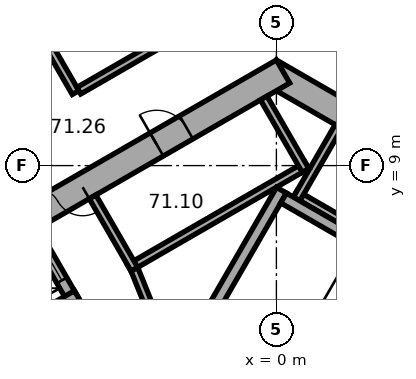
"""IFC4 building model, lengths in metres.
Left out: names, types, materials, properties, quantities, classifications, styles, units other than length and angle.
Written with IfcOpenShell. Run it as: python <this file> out.ifc"""

import sys

from ifc_helpers import new_model, si_unit, direction, frame, frame_2d, origin, place, context, subcontext, project, spatial, rectangle, extrude, element, fill, save


model = new_model("IFC4")
c1 = context("Model", 3, precision=1e-05, world=origin(), true_north=direction((0.0, 1.0)))
c2 = subcontext(c1, "Body", "Model", "MODEL_VIEW")
j1 = project(units=[si_unit("LENGTHUNIT", "METRE"), si_unit("PLANEANGLEUNIT", "RADIAN")], contexts=[c1])
p1 = place(None, origin())
s1 = spatial("IfcSite", under=j1, at=p1, CompositionType="ELEMENT")
p2 = place(p1, origin())
s2 = spatial("IfcBuilding", under=s1, at=p2, CompositionType="ELEMENT")
p3 = place(p2, frame((0.0, 0.0, 289.4)))
s3 = spatial("IfcBuildingStorey", under=s2, at=p3, CompositionType="ELEMENT", Elevation=289.4)
p4 = place(p3, frame((10.025, 5.586, 0.0), z_axis=(0.0, 0.0, 1.0), x_axis=(-0.866026453023, 0.499998182661, 0.0)))
e1 = element("IfcWall", 1, at=p4, inside=s3, PredefinedType="SHEAR", context=c2, shape_type="SweptSolid", body=[
    extrude(rectangle(XDim=11.778, YDim=0.7, at=frame_2d((5.889, 0.0))), origin(), (0.0, 0.0, 1.0), 3.7),
])
p5 = place(p4, frame((5.139, 0.0, 0.0)))
e2 = element("IfcOpeningElement", 2, at=p5, cuts=e1, PredefinedType="OPENING", context=c2, shape_type="SweptSolid", body=[
    extrude(rectangle(XDim=0.9, YDim=2.1, at=frame_2d((0.45, 1.05))), frame((0.0, 0.36, 0.0), z_axis=(0.0, -1.0, 0.0), x_axis=(1.0, 0.0, 0.0)), (0.0, 0.0, 1.0), 0.72),
])
p6 = place(p3, frame((0.175, 11.475, 0.0), z_axis=(0.0, 0.0, 1.0), x_axis=(-0.866026453023, -0.499998182661, 0.0)))
e3 = element("IfcWall", 3, at=p6, inside=s3, PredefinedType="SHEAR", context=c2, shape_type="SweptSolid", body=[
    extrude(rectangle(XDim=11.778, YDim=0.7, at=frame_2d((5.889, 0.0))), origin(), (0.0, 0.0, 1.0), 3.7),
])
p7 = place(p6, frame((6.089, 0.0, 0.0)))
e4 = element("IfcOpeningElement", 4, at=p7, cuts=e3, PredefinedType="OPENING", context=c2, shape_type="SweptSolid", body=[
    extrude(rectangle(XDim=1.5, YDim=2.1, at=frame_2d((0.75, 1.05))), frame((0.0, 0.36, 0.0), z_axis=(0.0, -1.0, 0.0), x_axis=(1.0, 0.0, 0.0)), (0.0, 0.0, 1.0), 0.72),
])
p8 = place(p6, frame((2.939, 0.0, 0.0)))
e5 = element("IfcOpeningElement", 5, at=p8, cuts=e3, PredefinedType="OPENING", context=c2, shape_type="SweptSolid", body=[
    extrude(rectangle(XDim=0.9, YDim=2.1, at=frame_2d((0.45, 1.05))), frame((0.0, 0.36, 0.0), z_axis=(0.0, -1.0, 0.0), x_axis=(1.0, 0.0, 0.0)), (0.0, 0.0, 1.0), 0.72),
])
p9 = place(p3, frame((-2.624, 20.713, 0.0), z_axis=(0.0, 0.0, 1.0), x_axis=(-0.866026460444, -0.499998169808, 0.0)))
e6 = element("IfcWall", 6, at=p9, inside=s3, PredefinedType="STANDARD", context=c2, shape_type="SweptSolid", body=[
    extrude(rectangle(XDim=17.731, YDim=0.2, at=frame_2d((8.866, 0.0))), origin(), (0.0, 0.0, 1.0), 3.7),
])
p10 = place(p9, frame((1.203, 0.0, 0.9)))
e7 = element("IfcOpeningElement", 7, at=p10, cuts=e6, PredefinedType="OPENING", context=c2, shape_type="SweptSolid", body=[
    extrude(rectangle(XDim=2.0, YDim=2.0, at=frame_2d((1.0, 1.0))), frame((0.0, 0.11, 0.0), z_axis=(0.0, -1.0, 0.0), x_axis=(1.0, 0.0, 0.0)), (0.0, 0.0, 1.0), 0.22),
])
p11 = place(p9, frame((4.535, 0.0, 0.9)))
e8 = element("IfcOpeningElement", 8, at=p11, cuts=e6, PredefinedType="OPENING", context=c2, shape_type="SweptSolid", body=[
    extrude(rectangle(XDim=2.0, YDim=2.0, at=frame_2d((1.0, 1.0))), frame((0.0, 0.11, 0.0), z_axis=(0.0, -1.0, 0.0), x_axis=(1.0, 0.0, 0.0)), (0.0, 0.0, 1.0), 0.22),
])
p12 = place(p9, frame((7.867, 0.0, 0.9)))
e9 = element("IfcOpeningElement", 9, at=p12, cuts=e6, PredefinedType="OPENING", context=c2, shape_type="SweptSolid", body=[
    extrude(rectangle(XDim=2.0, YDim=2.0, at=frame_2d((1.0, 1.0))), frame((0.0, 0.11, 0.0), z_axis=(0.0, -1.0, 0.0), x_axis=(1.0, 0.0, 0.0)), (0.0, 0.0, 1.0), 0.22),
])
p13 = place(p9, frame((11.198, 0.0, 0.9)))
e10 = element("IfcOpeningElement", 10, at=p13, cuts=e6, PredefinedType="OPENING", context=c2, shape_type="SweptSolid", body=[
    extrude(rectangle(XDim=2.0, YDim=2.0, at=frame_2d((1.0, 1.0))), frame((0.0, 0.11, 0.0), z_axis=(0.0, -1.0, 0.0), x_axis=(1.0, 0.0, 0.0)), (0.0, 0.0, 1.0), 0.22),
])
p14 = place(p9, frame((14.53, 0.0, 0.9)))
e11 = element("IfcOpeningElement", 11, at=p14, cuts=e6, PredefinedType="OPENING", context=c2, shape_type="SweptSolid", body=[
    extrude(rectangle(XDim=2.0, YDim=2.0, at=frame_2d((1.0, 1.0))), frame((0.0, 0.11, 0.0), z_axis=(0.0, -1.0, 0.0), x_axis=(1.0, 0.0, 0.0)), (0.0, 0.0, 1.0), 0.22),
])
p15 = place(p3, frame((7.424, 4.259, 0.0), z_axis=(0.0, 0.0, 1.0), x_axis=(-0.866026010844, 0.49999894854, 0.0)))
e12 = element("IfcWall", 12, at=p15, inside=s3, PredefinedType="PARTITIONING", context=c2, shape_type="SweptSolid", body=[
    extrude(rectangle(XDim=8.0, YDim=0.2, at=frame_2d((4.0, 0.0))), origin(), (0.0, 0.0, 1.0), 3.42),
])
p16 = place(p3, frame((0.532, 8.122, 0.0), z_axis=(0.0, 0.0, 1.0), x_axis=(0.500077893725, 0.86598042715, 0.0)))
e13 = element("IfcWall", 13, at=p16, inside=s3, PredefinedType="PARTITIONING", context=c2, shape_type="SweptSolid", body=[
    extrude(rectangle(XDim=2.2, YDim=0.2, at=frame_2d((1.1, 0.0))), origin(), (0.0, 0.0, 1.0), 3.42),
])
p17 = place(p3, frame((0.803, 9.009, 0.0), z_axis=(0.0, 0.0, 1.0), x_axis=(-0.866028230842, -0.499995103361, 0.0)))
e14 = element("IfcWall", 14, at=p17, inside=s3, PredefinedType="PARTITIONING", context=c2, shape_type="SweptSolid", body=[
    extrude(rectangle(XDim=5.4, YDim=0.2, at=frame_2d((2.7, 0.0))), origin(), (0.0, 0.0, 1.0), 3.42),
])
p18 = place(p3, frame((0.767, 8.872, 0.0), z_axis=(0.0, 0.0, 1.0), x_axis=(-0.499994660107, 0.866028486751, 0.0)))
e15 = element("IfcWall", 15, at=p18, inside=s3, PredefinedType="PARTITIONING", context=c2, shape_type="SweptSolid", body=[
    extrude(rectangle(XDim=2.2, YDim=0.2, at=frame_2d((1.1, 0.0))), origin(), (0.0, 0.0, 1.0), 3.42),
])
p19 = place(p3, frame((-3.737, 6.272, 0.0), z_axis=(0.0, 0.0, 1.0), x_axis=(-0.50002983664, 0.866008176907, 0.0)))
e16 = element("IfcWall", 16, at=p19, inside=s3, PredefinedType="PARTITIONING", context=c2, shape_type="SweptSolid", body=[
    extrude(rectangle(XDim=2.2, YDim=0.2, at=frame_2d((1.1, 0.0))), origin(), (0.0, 0.0, 1.0), 3.42),
])
p20 = place(p3, frame((-2.216, 4.282, 0.0), z_axis=(0.0, 0.0, 1.0), x_axis=(0.499977259774, 0.866038532462, 0.0)))
e17 = element("IfcWall", 17, at=p20, inside=s3, PredefinedType="SHEAR", context=c2, shape_type="SweptSolid", body=[
    extrude(rectangle(XDim=4.7, YDim=0.3, at=frame_2d((2.35, 0.0))), origin(), (0.0, 0.0, 1.0), 3.42),
])
p21 = place(p3, frame((6.303, 4.617, 0.0), z_axis=(0.0, 0.0, 1.0), x_axis=(-0.866027801685, 0.499995846692, 0.0)))
e18 = element("IfcWall", 18, at=p21, inside=s3, PredefinedType="SHEAR", context=c2, shape_type="SweptSolid", body=[
    extrude(rectangle(XDim=7.06, YDim=0.3, at=frame_2d((3.53, 0.0))), origin(), (0.0, 0.0, 1.0), 3.42),
])
p22 = place(p3, frame((-5.295, 5.372, 0.0), z_axis=(0.0, 0.0, 1.0), x_axis=(-0.500077893725, 0.86598042715, 0.0)))
e19 = element("IfcWall", 19, at=p22, inside=s3, PredefinedType="SHEAR", context=c2, shape_type="SweptSolid", body=[
    extrude(rectangle(XDim=2.2, YDim=0.3, at=frame_2d((1.1, 0.0))), origin(), (0.0, 0.0, 1.0), 3.42),
])
p23 = place(p22, frame((0.7, 0.0, 0.0)))
e20 = element("IfcOpeningElement", 20, at=p23, cuts=e19, PredefinedType="OPENING", context=c2, shape_type="SweptSolid", body=[
    extrude(rectangle(XDim=1.1, YDim=2.1, at=frame_2d((0.55, 1.05))), frame((0.0, 0.16, 0.0), z_axis=(0.0, -1.0, 0.0), x_axis=(1.0, 0.0, 0.0)), (0.0, 0.0, 1.0), 0.32),
])
p24 = place(p3, frame((-5.24, 5.577, 0.0), z_axis=(0.0, 0.0, 1.0), x_axis=(-0.866014461049, -0.500018952895, 0.0)))
e21 = element("IfcWall", 21, at=p24, inside=s3, PredefinedType="SHEAR", context=c2, shape_type="SweptSolid", body=[
    extrude(rectangle(XDim=3.35, YDim=0.3, at=frame_2d((1.675, 0.0))), origin(), (0.0, 0.0, 1.0), 3.42),
])
p25 = place(p3, frame((-2.615, 3.487, 0.0), z_axis=(0.0, 0.0, 1.0), x_axis=(-0.373576831041, 0.92759924068, 0.0)))
e22 = element("IfcWall", 22, at=p25, inside=s3, PredefinedType="PARTITIONING", context=c2, shape_type="SweptSolid", body=[
    extrude(rectangle(XDim=3.002, YDim=0.2, at=frame_2d((1.501, 0.0))), origin(), (0.0, 0.0, 1.0), 3.42),
])
p26 = place(p3, frame((-8.46, 16.42, 0.0), z_axis=(0.0, 0.0, 1.0), x_axis=(0.500005339912, -0.866022320763, 0.0)))
e23 = element("IfcWall", 23, at=p26, inside=s3, PredefinedType="PARTITIONING", context=c2, shape_type="SweptSolid", body=[
    extrude(rectangle(XDim=6.35, YDim=0.2, at=frame_2d((3.175, 0.0))), origin(), (0.0, 0.0, 1.0), 2.87),
])
p27 = place(p26, frame((2.675, 0.0, 0.0)))
e24 = element("IfcOpeningElement", 24, at=p27, cuts=e23, PredefinedType="OPENING", context=c2, shape_type="SweptSolid", body=[
    extrude(rectangle(XDim=1.0, YDim=2.1, at=frame_2d((0.5, 1.05))), frame((0.0, 0.11, 0.0), z_axis=(0.0, -1.0, 0.0), x_axis=(1.0, 0.0, 0.0)), (0.0, 0.0, 1.0), 0.22),
])
p28 = place(p3, frame((-0.95, 13.423, 0.0), z_axis=(0.0, 0.0, 1.0), x_axis=(-0.86603557629, -0.499982380289, 0.0)))
e25 = element("IfcWall", 25, at=p28, inside=s3, PredefinedType="PARTITIONING", context=c2, shape_type="SweptSolid", body=[
    extrude(rectangle(XDim=4.906, YDim=0.2, at=frame_2d((2.453, 0.0))), origin(), (0.0, 0.0, 1.0), 3.42),
])
p29 = place(p3, frame((10.934, 7.659, 0.0), z_axis=(0.0, 0.0, 1.0), x_axis=(-0.866030932647, 0.499990423607, 0.0)))
e26 = element("IfcWall", 26, at=p29, inside=s3, PredefinedType="PARTITIONING", context=c2, shape_type="SweptSolid", body=[
    extrude(rectangle(XDim=11.488, YDim=0.2, at=frame_2d((5.744, 0.0))), origin(), (0.0, 0.0, 1.0), 3.42),
])
p30 = place(p29, frame((6.764, 0.0, 0.0)))
e27 = element("IfcOpeningElement", 27, at=p30, cuts=e26, PredefinedType="OPENING", context=c2, shape_type="SweptSolid", body=[
    extrude(rectangle(XDim=1.0, YDim=2.1, at=frame_2d((0.5, 1.05))), frame((0.0, 0.11, 0.0), z_axis=(0.0, -1.0, 0.0), x_axis=(1.0, 0.0, 0.0)), (0.0, 0.0, 1.0), 0.22),
])
p31 = place(p7, origin())
e28 = element("IfcDoor", 28, at=p31, inside=s3, OperationType="DOUBLE_DOOR_SINGLE_SWING", PredefinedType="DOOR", context=c2, shape_type="SweptSolid", body=[
    extrude(rectangle(XDim=1.5, YDim=2.1, at=frame_2d((0.75, 1.05))), frame((0.0, 0.025, 0.0), z_axis=(0.0, -1.0, 0.0), x_axis=(1.0, 0.0, 0.0)), (0.0, 0.0, 1.0), 0.05),
])
fill(e4, e28)
p32 = place(p8, origin())
e29 = element("IfcDoor", 29, at=p32, inside=s3, OperationType="SINGLE_SWING_LEFT", PredefinedType="DOOR", context=c2, shape_type="SweptSolid", body=[
    extrude(rectangle(XDim=0.9, YDim=2.1, at=frame_2d((0.45, 1.05))), frame((0.0, 0.025, 0.0), z_axis=(0.0, -1.0, 0.0), x_axis=(1.0, 0.0, 0.0)), (0.0, 0.0, 1.0), 0.05),
])
fill(e5, e29)
p33 = place(p23, origin())
e30 = element("IfcDoor", 30, at=p33, inside=s3, OperationType="DOUBLE_DOOR_SLIDING", PredefinedType="DOOR", context=c2, shape_type="SweptSolid", body=[
    extrude(rectangle(XDim=1.1, YDim=2.1, at=frame_2d((0.55, 1.05))), frame((0.0, 0.025, 0.0), z_axis=(0.0, -1.0, 0.0), x_axis=(1.0, 0.0, 0.0)), (0.0, 0.0, 1.0), 0.05),
])
fill(e20, e30)
save(model, sys.argv[1])
